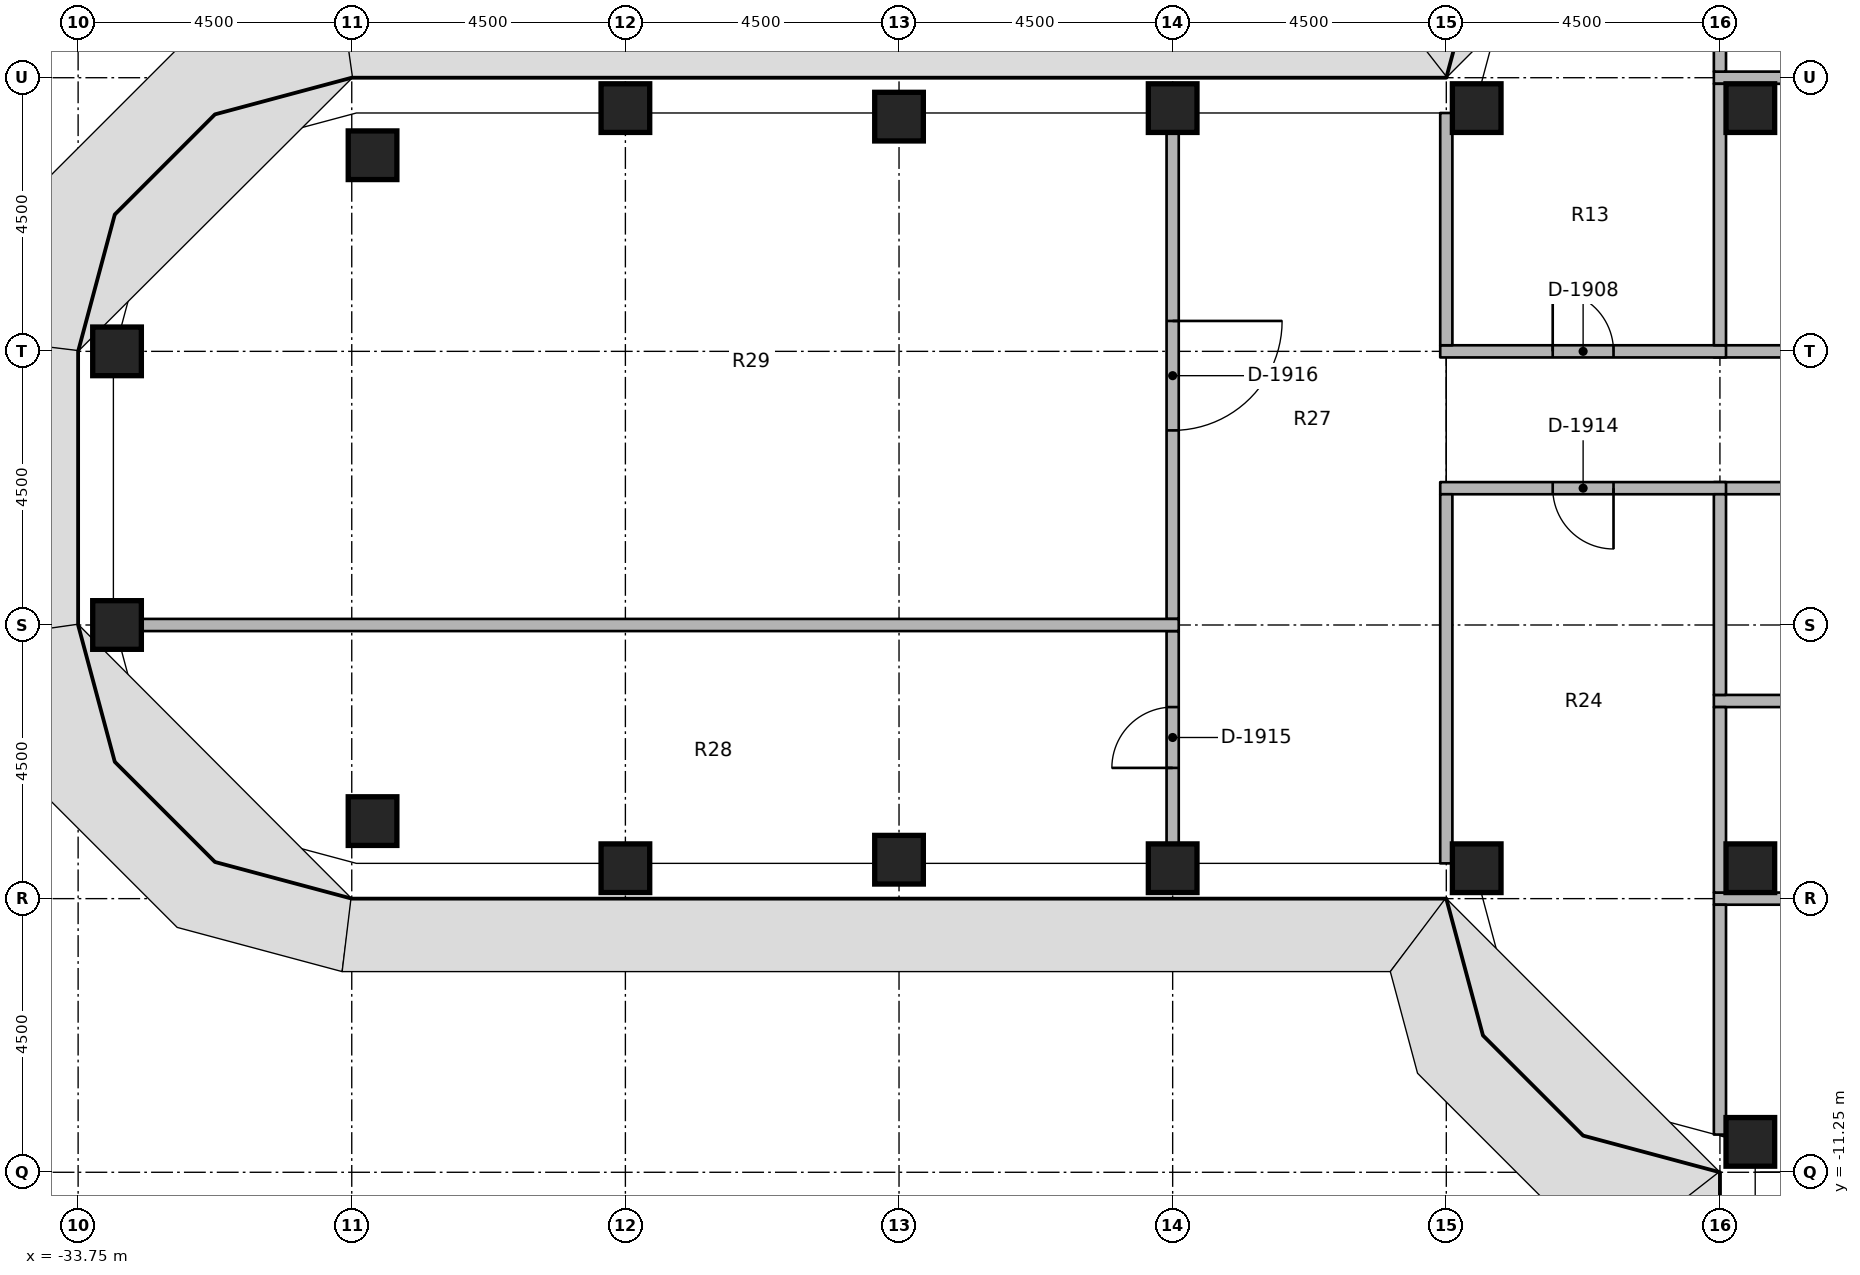
"""IFC4 building model, lengths in metres.
Left out: names, types, materials, properties, quantities, classifications, styles, units other than length and angle.
Written with IfcOpenShell. Run it as: python <this file> out.ifc"""

import sys

from ifc_helpers import new_model, si_unit, direction, frame, frame_2d, origin, origin_2d, place, context, subcontext, project, spatial, rectangle, extrude, element, fill, save


model = new_model("IFC4")
c1 = context("Model", 3, precision=1e-05, world=origin(), true_north=direction((0.0, 1.0)))
c2 = subcontext(c1, "Body", "Model", "MODEL_VIEW")
j1 = project(units=[si_unit("LENGTHUNIT", "METRE"), si_unit("PLANEANGLEUNIT", "RADIAN")], contexts=[c1])
p1 = place(None, origin())
s1 = spatial("IfcSite", under=j1, at=p1, CompositionType="ELEMENT")
p2 = place(p1, origin())
s2 = spatial("IfcBuilding", under=s1, at=p2, CompositionType="ELEMENT")
p3 = place(p2, frame((0.0, 0.0, 179.0)))
s3 = spatial("IfcBuildingStorey", under=s2, at=p3, CompositionType="ELEMENT", Elevation=179.0)
for number, where, z_axis, x_axis in (
    (1, (-33.11, -2.25, 0.0), (0.0, 0.0, 1.0), (1.0, 0.0, 0.0)),
    (2, (-33.11, 2.25, 0.0), (0.0, 0.0, 1.0), (1.0, 0.0, 0.0)),
    (3, (-28.908, -5.475, 0.0), (0.0, 0.0, 1.0), (1.0, 0.0, 0.0)),
    (4, (-28.908, 5.475, 0.0), (0.0, 0.0, 1.0), (1.0, 0.0, 0.0)),
    (5, (-24.75, -6.25, 0.0), (0.0, 0.0, 1.0), (1.0, 0.0, 0.0)),
    (6, (-24.75, 6.25, 0.0), (0.0, 0.0, 1.0), (1.0, 0.0, 0.0)),
    (7, (-20.25, -6.11, 0.0), (0.0, 0.0, 1.0), (1.0, 0.0, 0.0)),
    (8, (-20.25, 6.11, 0.0), (0.0, 0.0, 1.0), (1.0, 0.0, 0.0)),
    (9, (-15.75, -6.25, 0.0), (0.0, 0.0, 1.0), (1.0, 0.0, 0.0)),
    (10, (-15.75, 6.25, 0.0), (0.0, 0.0, 1.0), (1.0, 0.0, 0.0)),
    (11, (-10.75, -6.25, 0.0), (0.0, 0.0, 1.0), (1.0, 0.0, 0.0)),
    (12, (-10.75, 6.25, 0.0), (0.0, 0.0, 1.0), (1.0, 0.0, 0.0)),
    (13, (-6.25, -10.75, 0.0), (0.0, 0.0, 1.0), (1.0, 0.0, 0.0)),
    (14, (-6.25, -6.25, 0.0), (0.0, 0.0, 1.0), (1.0, 0.0, 0.0)),
    (15, (-6.25, 6.25, 0.0), (0.0, 0.0, 1.0), (1.0, 0.0, 0.0)),
):
    element("IfcColumn", number, at=place(p3, frame(where, z_axis=z_axis, x_axis=x_axis)), inside=s3, PredefinedType="COLUMN", context=c2, shape_type="SweptSolid", body=[
        extrude(rectangle(XDim=0.8, YDim=0.8, at=origin_2d()), origin(), (0.0, 0.0, 1.0), 3.65),
    ])
p4 = place(p3, frame((-6.85, 2.25, 0.0), z_axis=(0.0, 0.0, 1.0), x_axis=(1.0, 0.0, 0.0)))
e16 = element("IfcWall", 16, at=p4, inside=s3, PredefinedType="PARTITIONING", context=c2, shape_type="SweptSolid", body=[
    extrude(rectangle(XDim=5.825, YDim=0.2, at=frame_2d((2.913, 0.0))), origin(), (0.0, 0.0, 1.0), 2.75),
])
p5 = place(p4, frame((2.413, 0.0, 0.0)))
e17 = element("IfcOpeningElement", 17, at=p5, cuts=e16, PredefinedType="OPENING", context=c2, shape_type="SweptSolid", body=[
    extrude(rectangle(XDim=1.0, YDim=2.1, at=frame_2d((0.5, 1.05))), frame((0.0, 0.11, 0.0), z_axis=(0.0, -1.0, 0.0), x_axis=(1.0, 0.0, 0.0)), (0.0, 0.0, 1.0), 0.22),
])
p6 = place(p3, frame((-11.35, 2.25, 0.0), z_axis=(0.0, 0.0, 1.0), x_axis=(1.0, 0.0, 0.0)))
e18 = element("IfcWall", 18, at=p6, inside=s3, PredefinedType="PARTITIONING", context=c2, shape_type="SweptSolid", body=[
    extrude(rectangle(XDim=4.7, YDim=0.2, at=frame_2d((2.35, 0.0))), origin(), (0.0, 0.0, 1.0), 2.75),
])
p7 = place(p6, frame((1.85, 0.0, 0.0)))
e19 = element("IfcOpeningElement", 19, at=p7, cuts=e18, PredefinedType="OPENING", context=c2, shape_type="SweptSolid", body=[
    extrude(rectangle(XDim=1.0, YDim=2.1, at=frame_2d((0.5, 1.05))), frame((0.0, 0.11, 0.0), z_axis=(0.0, -1.0, 0.0), x_axis=(1.0, 0.0, 0.0)), (0.0, 0.0, 1.0), 0.22),
])
p8 = place(p3, frame((-1.025, 0.0, 0.0), z_axis=(0.0, 0.0, 1.0), x_axis=(-1.0, 0.0, 0.0)))
e20 = element("IfcWall", 20, at=p8, inside=s3, PredefinedType="PARTITIONING", context=c2, shape_type="SweptSolid", body=[
    extrude(rectangle(XDim=5.825, YDim=0.2, at=frame_2d((2.913, 0.0))), origin(), (0.0, 0.0, 1.0), 2.75),
])
p9 = place(p8, frame((2.462, 0.0, 0.0)))
e21 = element("IfcOpeningElement", 21, at=p9, cuts=e20, PredefinedType="OPENING", context=c2, shape_type="SweptSolid", body=[
    extrude(rectangle(XDim=0.9, YDim=2.1, at=frame_2d((0.45, 1.05))), frame((0.0, 0.11, 0.0), z_axis=(0.0, -1.0, 0.0), x_axis=(1.0, 0.0, 0.0)), (0.0, 0.0, 1.0), 0.22),
])
p10 = place(p3, frame((-6.65, 0.0, 0.0), z_axis=(0.0, 0.0, 1.0), x_axis=(-1.0, 0.0, 0.0)))
e22 = element("IfcWall", 22, at=p10, inside=s3, PredefinedType="PARTITIONING", context=c2, shape_type="SweptSolid", body=[
    extrude(rectangle(XDim=4.7, YDim=0.2, at=frame_2d((2.35, 0.0))), origin(), (0.0, 0.0, 1.0), 2.75),
])
p11 = place(p10, frame((1.85, 0.0, 0.0)))
e23 = element("IfcOpeningElement", 23, at=p11, cuts=e22, PredefinedType="OPENING", context=c2, shape_type="SweptSolid", body=[
    extrude(rectangle(XDim=1.0, YDim=2.1, at=frame_2d((0.5, 1.05))), frame((0.0, 0.11, 0.0), z_axis=(0.0, -1.0, 0.0), x_axis=(1.0, 0.0, 0.0)), (0.0, 0.0, 1.0), 0.22),
])
p12 = place(p3, frame((-6.85, 6.75, 0.0), z_axis=(0.0, 0.0, 1.0), x_axis=(1.0, 0.0, 0.0)))
e24 = element("IfcWall", 24, at=p12, inside=s3, PredefinedType="PARTITIONING", context=c2, shape_type="SweptSolid", body=[
    extrude(rectangle(XDim=5.825, YDim=0.2, at=frame_2d((2.913, 0.0))), origin(), (0.0, 0.0, 1.0), 2.75),
])
p13 = place(p3, frame((-6.75, 6.85, 0.0), z_axis=(0.0, 0.0, 1.0), x_axis=(0.0, 1.0, 0.0)))
e25 = element("IfcWall", 25, at=p13, inside=s3, PredefinedType="PARTITIONING", context=c2, shape_type="SweptSolid", body=[
    extrude(rectangle(XDim=3.78, YDim=0.2, at=frame_2d((1.89, 0.0))), origin(), (0.0, 0.0, 1.0), 2.75),
])
p14 = place(p3, frame((-6.85, -6.75, 0.0), z_axis=(0.0, 0.0, 1.0), x_axis=(1.0, 0.0, 0.0)))
e26 = element("IfcWall", 26, at=p14, inside=s3, PredefinedType="PARTITIONING", context=c2, shape_type="SweptSolid", body=[
    extrude(rectangle(XDim=5.825, YDim=0.2, at=frame_2d((2.913, 0.0))), origin(), (0.0, 0.0, 1.0), 2.75),
])
p15 = place(p3, frame((-6.75, -10.63, 0.0), z_axis=(0.0, 0.0, 1.0), x_axis=(0.0, 1.0, 0.0)))
e27 = element("IfcWall", 27, at=p15, inside=s3, PredefinedType="PARTITIONING", context=c2, shape_type="SweptSolid", body=[
    extrude(rectangle(XDim=3.78, YDim=0.2, at=frame_2d((1.89, 0.0))), origin(), (0.0, 0.0, 1.0), 2.75),
])
p16 = place(p3, frame((-6.75, 2.35, 0.0), z_axis=(0.0, 0.0, 1.0), x_axis=(0.0, 1.0, 0.0)))
e28 = element("IfcWall", 28, at=p16, inside=s3, PredefinedType="PARTITIONING", context=c2, shape_type="SweptSolid", body=[
    extrude(rectangle(XDim=4.3, YDim=0.2, at=frame_2d((2.15, 0.0))), origin(), (0.0, 0.0, 1.0), 2.75),
])
p17 = place(p3, frame((-11.25, 2.35, 0.0), z_axis=(0.0, 0.0, 1.0), x_axis=(0.0, 1.0, 0.0)))
e29 = element("IfcWall", 29, at=p17, inside=s3, PredefinedType="PARTITIONING", context=c2, shape_type="SweptSolid", body=[
    extrude(rectangle(XDim=3.82, YDim=0.2, at=frame_2d((1.91, 0.0))), origin(), (0.0, 0.0, 1.0), 2.75),
])
p18 = place(p3, frame((-6.85, -3.5, 0.0), z_axis=(0.0, 0.0, 1.0), x_axis=(1.0, 0.0, 0.0)))
e30 = element("IfcWall", 30, at=p18, inside=s3, PredefinedType="PARTITIONING", context=c2, shape_type="SweptSolid", body=[
    extrude(rectangle(XDim=5.825, YDim=0.2, at=frame_2d((2.913, 0.0))), origin(), (0.0, 0.0, 1.0), 2.75),
])
p19 = place(p3, frame((-6.75, -3.4, 0.0), z_axis=(0.0, 0.0, 1.0), x_axis=(0.0, 1.0, 0.0)))
e31 = element("IfcWall", 31, at=p19, inside=s3, PredefinedType="PARTITIONING", context=c2, shape_type="SweptSolid", body=[
    extrude(rectangle(XDim=3.3, YDim=0.2, at=frame_2d((1.65, 0.0))), origin(), (0.0, 0.0, 1.0), 2.75),
])
p20 = place(p3, frame((-6.75, -6.65, 0.0), z_axis=(0.0, 0.0, 1.0), x_axis=(0.0, 1.0, 0.0)))
e32 = element("IfcWall", 32, at=p20, inside=s3, PredefinedType="PARTITIONING", context=c2, shape_type="SweptSolid", body=[
    extrude(rectangle(XDim=3.05, YDim=0.2, at=frame_2d((1.525, 0.0))), origin(), (0.0, 0.0, 1.0), 2.75),
])
p21 = place(p3, frame((-11.25, -6.17, 0.0), z_axis=(0.0, 0.0, 1.0), x_axis=(0.0, 1.0, 0.0)))
e33 = element("IfcWall", 33, at=p21, inside=s3, PredefinedType="PARTITIONING", context=c2, shape_type="SweptSolid", body=[
    extrude(rectangle(XDim=6.07, YDim=0.2, at=frame_2d((3.035, 0.0))), origin(), (0.0, 0.0, 1.0), 2.75),
])
p22 = place(p3, frame((-15.75, -5.85, 0.0), z_axis=(0.0, 0.0, 1.0), x_axis=(0.0, 1.0, 0.0)))
e34 = element("IfcWall", 34, at=p22, inside=s3, PredefinedType="PARTITIONING", context=c2, shape_type="SweptSolid", body=[
    extrude(rectangle(XDim=3.5, YDim=0.2, at=frame_2d((1.75, 0.0))), origin(), (0.0, 0.0, 1.0), 2.75),
])
p23 = place(p22, frame((1.25, 0.0, 0.0)))
e35 = element("IfcOpeningElement", 35, at=p23, cuts=e34, PredefinedType="OPENING", context=c2, shape_type="SweptSolid", body=[
    extrude(rectangle(XDim=1.0, YDim=2.1, at=frame_2d((0.5, 1.05))), frame((0.0, 0.11, 0.0), z_axis=(0.0, -1.0, 0.0), x_axis=(1.0, 0.0, 0.0)), (0.0, 0.0, 1.0), 0.22),
])
p24 = place(p3, frame((-15.75, 5.85, 0.0), z_axis=(0.0, 0.0, 1.0), x_axis=(0.0, -1.0, 0.0)))
e36 = element("IfcWall", 36, at=p24, inside=s3, PredefinedType="PARTITIONING", context=c2, shape_type="SweptSolid", body=[
    extrude(rectangle(XDim=8.0, YDim=0.2, at=frame_2d((4.0, 0.0))), origin(), (0.0, 0.0, 1.0), 2.75),
])
p25 = place(p24, frame((3.1, 0.0, 0.0)))
e37 = element("IfcOpeningElement", 37, at=p25, cuts=e36, PredefinedType="OPENING", context=c2, shape_type="SweptSolid", body=[
    extrude(rectangle(XDim=1.8, YDim=2.1, at=frame_2d((0.9, 1.05))), frame((0.0, 0.11, 0.0), z_axis=(0.0, -1.0, 0.0), x_axis=(1.0, 0.0, 0.0)), (0.0, 0.0, 1.0), 0.22),
])
p26 = place(p3, frame((-32.71, -2.25, 0.0), z_axis=(0.0, 0.0, 1.0), x_axis=(1.0, 0.0, 0.0)))
e38 = element("IfcWall", 38, at=p26, inside=s3, PredefinedType="PARTITIONING", context=c2, shape_type="SweptSolid", body=[
    extrude(rectangle(XDim=17.06, YDim=0.2, at=frame_2d((8.53, 0.0))), origin(), (0.0, 0.0, 1.0), 2.75),
])
p27 = place(p7, origin())
e39 = element("IfcDoor", 39, at=p27, inside=s3, OperationType="SINGLE_SWING_RIGHT", PredefinedType="DOOR", context=c2, shape_type="SweptSolid", body=[
    extrude(rectangle(XDim=1.0, YDim=2.1, at=frame_2d((0.5, 1.05))), frame((0.0, 0.025, 0.0), z_axis=(0.0, -1.0, 0.0), x_axis=(1.0, 0.0, 0.0)), (0.0, 0.0, 1.0), 0.05),
])
fill(e19, e39)
p28 = place(p11, origin())
e40 = element("IfcDoor", 40, at=p28, inside=s3, OperationType="SINGLE_SWING_RIGHT", PredefinedType="DOOR", context=c2, shape_type="SweptSolid", body=[
    extrude(rectangle(XDim=1.0, YDim=2.1, at=frame_2d((0.5, 1.05))), frame((0.0, 0.025, 0.0), z_axis=(0.0, -1.0, 0.0), x_axis=(1.0, 0.0, 0.0)), (0.0, 0.0, 1.0), 0.05),
])
fill(e23, e40)
p29 = place(p23, origin())
e41 = element("IfcDoor", 41, at=p29, inside=s3, OperationType="SINGLE_SWING_RIGHT", PredefinedType="DOOR", context=c2, shape_type="SweptSolid", body=[
    extrude(rectangle(XDim=1.0, YDim=2.1, at=frame_2d((0.5, 1.05))), frame((0.0, 0.025, 0.0), z_axis=(0.0, -1.0, 0.0), x_axis=(1.0, 0.0, 0.0)), (0.0, 0.0, 1.0), 0.05),
])
fill(e35, e41)
p30 = place(p25, origin())
e42 = element("IfcDoor", 42, at=p30, inside=s3, OperationType="DOUBLE_DOOR_SINGLE_SWING", PredefinedType="DOOR", context=c2, shape_type="SweptSolid", body=[
    extrude(rectangle(XDim=1.8, YDim=2.1, at=frame_2d((0.9, 1.05))), frame((0.0, 0.025, 0.0), z_axis=(0.0, -1.0, 0.0), x_axis=(1.0, 0.0, 0.0)), (0.0, 0.0, 1.0), 0.05),
])
fill(e37, e42)
save(model, sys.argv[1])
